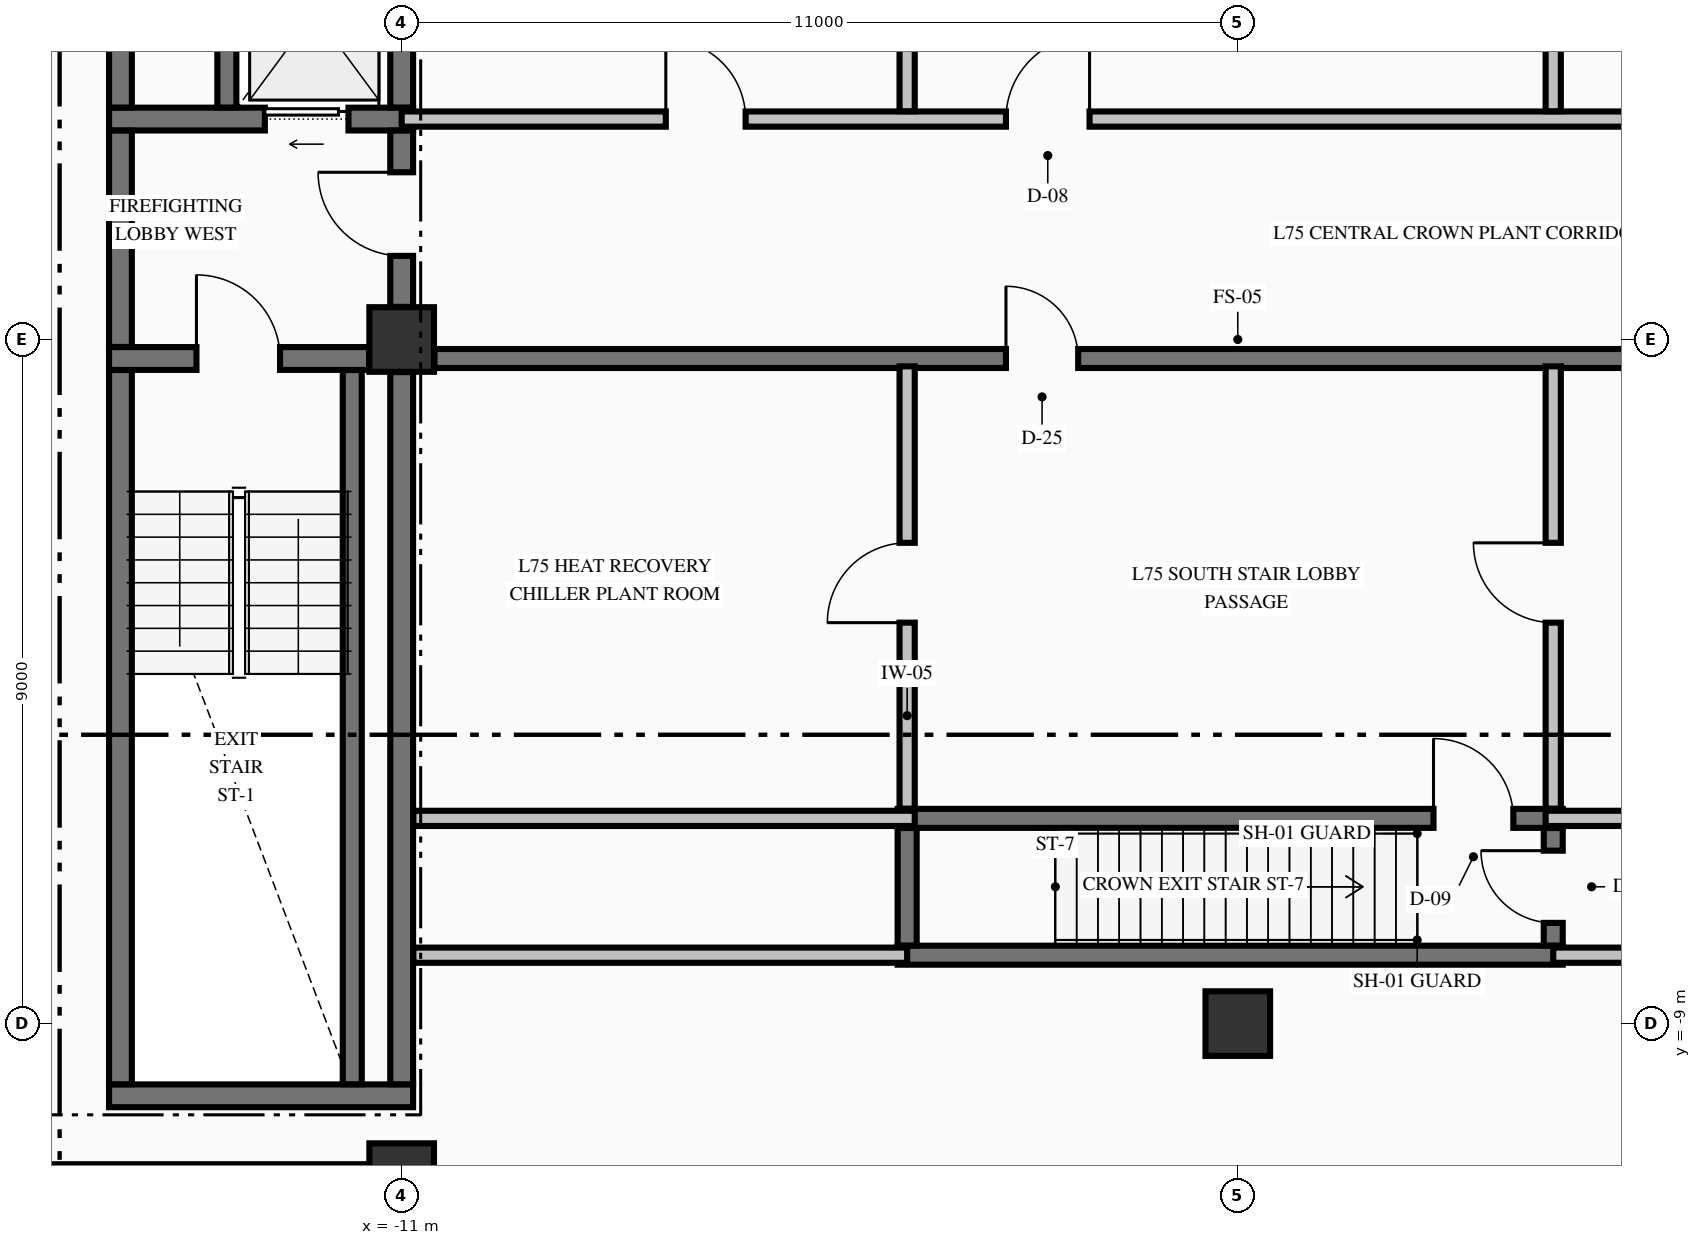
"""IFC4 building model, lengths in metres.
Left out: names, types, materials, properties, quantities, classifications, styles, units other than length and angle.
Written with IfcOpenShell. Run it as: python <this file> out.ifc"""

import sys

from ifc_helpers import new_model, si_unit, direction, frame, frame_2d, origin, origin_2d, place, context, subcontext, project, spatial, rectangle, extrude, element, fill, save


model = new_model("IFC4")
c1 = context("Model", 3, precision=1e-05, world=origin(), true_north=direction((0.0, 1.0)))
c2 = subcontext(c1, "Body", "Model", "MODEL_VIEW")
j1 = project(units=[si_unit("LENGTHUNIT", "METRE"), si_unit("PLANEANGLEUNIT", "RADIAN")], contexts=[c1])
p1 = place(None, origin())
s1 = spatial("IfcSite", under=j1, at=p1, CompositionType="ELEMENT")
p2 = place(p1, origin())
s2 = spatial("IfcBuilding", under=s1, at=p2, CompositionType="ELEMENT")
p3 = place(p2, frame((0.0, 0.0, 281.8)))
s3 = spatial("IfcBuildingStorey", under=s2, at=p3, CompositionType="ELEMENT", Elevation=281.8)
for number, where, z_axis, x_axis in (
    (1, (-11.0, -11.0, -0.325), (0.0, 0.0, 1.0), (1.0, 0.0, 0.0)),
    (2, (-11.0, 0.0, -0.325), (0.0, 0.0, 1.0), (1.0, 0.0, 0.0)),
    (3, (0.0, -9.0, -0.325), (0.0, 0.0, 1.0), (1.0, 0.0, 0.0)),
):
    element("IfcColumn", number, at=place(p3, frame(where, z_axis=z_axis, x_axis=x_axis)), inside=s3, PredefinedType="COLUMN", context=c2, shape_type="SweptSolid", body=[
        extrude(rectangle(XDim=0.85, YDim=0.85, at=origin_2d()), origin(), (0.0, 0.0, 1.0), 3.06),
    ])
p4 = place(p3, frame((-19.545, -11.0, 0.0), z_axis=(0.0, 0.0, 1.0), x_axis=(1.0, 0.0, 0.0)))
e4 = element("IfcWall", 4, at=p4, inside=s3, PredefinedType="STANDARD", context=c2, shape_type="SweptSolid", body=[
    extrude(rectangle(XDim=8.09, YDim=0.3, at=frame_2d((4.045, 0.0))), origin(), (0.0, 0.0, 1.0), 1.077),
])
p5 = place(p3, frame((-14.85, -9.95, 0.0), z_axis=(0.0, 0.0, 1.0), x_axis=(1.0, 0.0, 0.0)))
e5 = element("IfcWall", 5, at=p5, inside=s3, PredefinedType="SHEAR", context=c2, shape_type="SweptSolid", body=[
    extrude(rectangle(XDim=4.0, YDim=0.3, at=frame_2d((2.0, 0.0))), origin(), (0.0, 0.0, 1.0), 2.735),
])
p6 = place(p3, frame((-4.475, -8.1, 0.0), z_axis=(0.0, 0.0, 1.0), x_axis=(1.0, 0.0, 0.0)))
e6 = element("IfcWall", 6, at=p6, inside=s3, PredefinedType="SOLIDWALL", context=c2, shape_type="SweptSolid", body=[
    extrude(rectangle(XDim=8.75, YDim=0.25, at=frame_2d((4.375, 0.0))), origin(), (0.0, 0.0, 1.0), 2.735),
])
p7 = place(p3, frame((-4.475, -6.3, 0.0), z_axis=(0.0, 0.0, 1.0), x_axis=(1.0, 0.0, 0.0)))
e7 = element("IfcWall", 7, at=p7, inside=s3, PredefinedType="SOLIDWALL", context=c2, shape_type="SweptSolid", body=[
    extrude(rectangle(XDim=8.75, YDim=0.25, at=frame_2d((4.375, 0.0))), origin(), (0.0, 0.0, 1.0), 2.735),
])
p8 = place(p7, frame((7.05, 0.0, 0.0)))
e8 = element("IfcOpeningElement", 8, at=p8, cuts=e7, PredefinedType="OPENING", context=c2, shape_type="SweptSolid", body=[
    extrude(rectangle(XDim=1.05, YDim=2.15, at=frame_2d((0.525, 1.075))), frame((0.0, 0.135, 0.0), z_axis=(0.0, -1.0, 0.0), x_axis=(1.0, 0.0, 0.0)), (0.0, 0.0, 1.0), 0.27),
])
p9 = place(p3, frame((-14.85, -0.25, 0.0), z_axis=(0.0, 0.0, 1.0), x_axis=(1.0, 0.0, 0.0)))
e9 = element("IfcWall", 9, at=p9, inside=s3, PredefinedType="SHEAR", context=c2, shape_type="SweptSolid", body=[
    extrude(rectangle(XDim=3.421, YDim=0.3, at=frame_2d((1.71, 0.0))), origin(), (0.0, 0.0, 1.0), 2.735),
])
p10 = place(p9, frame((1.15, 0.0, 0.0)))
e10 = element("IfcOpeningElement", 10, at=p10, cuts=e9, PredefinedType="OPENING", context=c2, shape_type="SweptSolid", body=[
    extrude(rectangle(XDim=1.1, YDim=2.15, at=frame_2d((0.55, 1.075))), frame((0.0, 0.16, 0.0), z_axis=(0.0, -1.0, 0.0), x_axis=(1.0, 0.0, 0.0)), (0.0, 0.0, 1.0), 0.32),
])
p11 = place(p3, frame((-14.85, 2.9, 0.0), z_axis=(0.0, 0.0, 1.0), x_axis=(1.0, 0.0, 0.0)))
e11 = element("IfcWall", 11, at=p11, inside=s3, PredefinedType="SHEAR", context=c2, shape_type="SweptSolid", body=[
    extrude(rectangle(XDim=4.0, YDim=0.3, at=frame_2d((2.0, 0.0))), origin(), (0.0, 0.0, 1.0), 2.735),
])
p12 = place(p11, frame((2.05, 0.0, 0.0)))
e12 = element("IfcOpeningElement", 12, at=p12, cuts=e11, PredefinedType="OPENING", context=c2, shape_type="SweptSolid", body=[
    extrude(rectangle(XDim=1.1, YDim=2.2, at=frame_2d((0.55, 1.1))), frame((0.0, 0.16, 0.0), z_axis=(0.0, -1.0, 0.0), x_axis=(1.0, 0.0, 0.0)), (0.0, 0.0, 1.0), 0.32),
])
p13 = place(p3, frame((-10.847, -8.1, 0.0), z_axis=(0.0, 0.0, 1.0), x_axis=(1.0, 0.0, 0.0)))
e13 = element("IfcWall", 13, at=p13, inside=s3, PredefinedType="PARTITIONING", context=c2, shape_type="SweptSolid", body=[
    extrude(rectangle(XDim=6.497, YDim=0.2, at=frame_2d((3.249, 0.0))), origin(), (0.0, 0.0, 1.0), 2.735),
])
p14 = place(p3, frame((4.15, -8.1, 0.0), z_axis=(0.0, 0.0, 1.0), x_axis=(1.0, 0.0, 0.0)))
e14 = element("IfcWall", 14, at=p14, inside=s3, PredefinedType="PARTITIONING", context=c2, shape_type="SweptSolid", body=[
    extrude(rectangle(XDim=6.697, YDim=0.2, at=frame_2d((3.349, 0.0))), origin(), (0.0, 0.0, 1.0), 2.735),
])
p15 = place(p14, frame((2.125, 0.0, 0.0)))
e15 = element("IfcOpeningElement", 15, at=p15, cuts=e14, PredefinedType="OPENING", context=c2, shape_type="SweptSolid", body=[
    extrude(rectangle(XDim=1.05, YDim=2.15, at=frame_2d((0.525, 1.075))), frame((0.0, 0.11, 0.0), z_axis=(0.0, -1.0, 0.0), x_axis=(1.0, 0.0, 0.0)), (0.0, 0.0, 1.0), 0.22),
])
p16 = place(p3, frame((-10.847, -6.3, 0.0), z_axis=(0.0, 0.0, 1.0), x_axis=(1.0, 0.0, 0.0)))
e16 = element("IfcWall", 16, at=p16, inside=s3, PredefinedType="PARTITIONING", context=c2, shape_type="SweptSolid", body=[
    extrude(rectangle(XDim=6.597, YDim=0.2, at=frame_2d((3.298, 0.0))), origin(), (0.0, 0.0, 1.0), 2.735),
])
p17 = place(p3, frame((4.05, -6.3, 0.0), z_axis=(0.0, 0.0, 1.0), x_axis=(1.0, 0.0, 0.0)))
e17 = element("IfcWall", 17, at=p17, inside=s3, PredefinedType="PARTITIONING", context=c2, shape_type="SweptSolid", body=[
    extrude(rectangle(XDim=6.797, YDim=0.2, at=frame_2d((3.398, 0.0))), origin(), (0.0, 0.0, 1.0), 2.735),
])
p18 = place(p3, frame((-10.569, -0.25, 0.0), z_axis=(0.0, 0.0, 1.0), x_axis=(1.0, 0.0, 0.0)))
e18 = element("IfcWall", 18, at=p18, inside=s3, PredefinedType="SOLIDWALL", context=c2, shape_type="SweptSolid", body=[
    extrude(rectangle(XDim=21.138, YDim=0.25, at=frame_2d((10.569, 0.0))), origin(), (0.0, 0.0, 1.0), 2.735),
])
p19 = place(p18, frame((7.519, 0.0, 0.0)))
e19 = element("IfcOpeningElement", 19, at=p19, cuts=e18, PredefinedType="OPENING", context=c2, shape_type="SweptSolid", body=[
    extrude(rectangle(XDim=0.95, YDim=2.02, at=frame_2d((0.475, 1.01))), frame((0.0, 0.135, 0.0), z_axis=(0.0, -1.0, 0.0), x_axis=(1.0, 0.0, 0.0)), (0.0, 0.0, 1.0), 0.27),
])
p20 = place(p3, frame((-11.0, 2.9, 0.0), z_axis=(0.0, 0.0, 1.0), x_axis=(1.0, 0.0, 0.0)))
e20 = element("IfcWall", 20, at=p20, inside=s3, PredefinedType="PARTITIONING", context=c2, shape_type="SweptSolid", body=[
    extrude(rectangle(XDim=22.0, YDim=0.2, at=frame_2d((11.0, 0.0))), origin(), (0.0, 0.0, 1.0), 2.735),
])
p21 = place(p20, frame((7.95, 0.0, 0.0)))
e21 = element("IfcOpeningElement", 21, at=p21, cuts=e20, PredefinedType="OPENING", context=c2, shape_type="SweptSolid", body=[
    extrude(rectangle(XDim=1.1, YDim=2.15, at=frame_2d((0.55, 1.075))), frame((0.0, 0.11, 0.0), z_axis=(0.0, -1.0, 0.0), x_axis=(1.0, 0.0, 0.0)), (0.0, 0.0, 1.0), 0.22),
])
p22 = place(p20, frame((17.475, 0.0, 0.0)))
e22 = element("IfcOpeningElement", 22, at=p22, cuts=e20, PredefinedType="OPENING", context=c2, shape_type="SweptSolid", body=[
    extrude(rectangle(XDim=1.05, YDim=2.15, at=frame_2d((0.525, 1.075))), frame((0.0, 0.11, 0.0), z_axis=(0.0, -1.0, 0.0), x_axis=(1.0, 0.0, 0.0)), (0.0, 0.0, 1.0), 0.22),
])
p23 = place(p20, frame((3.475, 0.0, 0.0)))
e23 = element("IfcOpeningElement", 23, at=p23, cuts=e20, PredefinedType="OPENING", context=c2, shape_type="SweptSolid", body=[
    extrude(rectangle(XDim=1.05, YDim=2.15, at=frame_2d((0.525, 1.075))), frame((0.0, 0.11, 0.0), z_axis=(0.0, -1.0, 0.0), x_axis=(1.0, 0.0, 0.0)), (0.0, 0.0, 1.0), 0.22),
])
p24 = place(p3, frame((-14.7, -9.798, 0.0), z_axis=(0.0, 0.0, 1.0), x_axis=(0.0, 1.0, 0.0)))
e24 = element("IfcWall", 24, at=p24, inside=s3, PredefinedType="SHEAR", context=c2, shape_type="SweptSolid", body=[
    extrude(rectangle(XDim=9.396, YDim=0.3, at=frame_2d((4.698, 0.0))), origin(), (0.0, 0.0, 1.0), 2.735),
])
p25 = place(p3, frame((-14.7, -0.098, 0.0), z_axis=(0.0, 0.0, 1.0), x_axis=(0.0, 1.0, 0.0)))
e25 = element("IfcWall", 25, at=p25, inside=s3, PredefinedType="SHEAR", context=c2, shape_type="SweptSolid", body=[
    extrude(rectangle(XDim=2.846, YDim=0.3, at=frame_2d((1.423, 0.0))), origin(), (0.0, 0.0, 1.0), 2.735),
])
p26 = place(p3, frame((-14.7, 3.052, 0.0), z_axis=(0.0, 0.0, 1.0), x_axis=(0.0, 1.0, 0.0)))
e26 = element("IfcWall", 26, at=p26, inside=s3, PredefinedType="SHEAR", context=c2, shape_type="SweptSolid", body=[
    extrude(rectangle(XDim=2.496, YDim=0.3, at=frame_2d((1.248, 0.0))), origin(), (0.0, 0.0, 1.0), 2.735),
])
p27 = place(p3, frame((-13.3, 3.052, 0.0), z_axis=(0.0, 0.0, 1.0), x_axis=(0.0, 1.0, 0.0)))
e27 = element("IfcWall", 27, at=p27, inside=s3, PredefinedType="SOLIDWALL", context=c2, shape_type="SweptSolid", body=[
    extrude(rectangle(XDim=2.496, YDim=0.25, at=frame_2d((1.248, 0.0))), origin(), (0.0, 0.0, 1.0), 2.735),
])
p28 = place(p3, frame((-11.65, -9.798, 0.0), z_axis=(0.0, 0.0, 1.0), x_axis=(0.0, 1.0, 0.0)))
e28 = element("IfcWall", 28, at=p28, inside=s3, PredefinedType="SOLIDWALL", context=c2, shape_type="SweptSolid", body=[
    extrude(rectangle(XDim=9.396, YDim=0.25, at=frame_2d((4.698, 0.0))), origin(), (0.0, 0.0, 1.0), 2.735),
])
p29 = place(p3, frame((-11.0, -9.798, 0.0), z_axis=(0.0, 0.0, 1.0), x_axis=(0.0, 1.0, 0.0)))
e29 = element("IfcWall", 29, at=p29, inside=s3, PredefinedType="SHEAR", context=c2, shape_type="SweptSolid", body=[
    extrude(rectangle(XDim=9.369, YDim=0.3, at=frame_2d((4.685, 0.0))), origin(), (0.0, 0.0, 1.0), 2.735),
])
p30 = place(p3, frame((-11.0, 0.429, 0.0), z_axis=(0.0, 0.0, 1.0), x_axis=(0.0, 1.0, 0.0)))
e30 = element("IfcWall", 30, at=p30, inside=s3, PredefinedType="SHEAR", context=c2, shape_type="SweptSolid", body=[
    extrude(rectangle(XDim=2.319, YDim=0.3, at=frame_2d((1.16, 0.0))), origin(), (0.0, 0.0, 1.0), 2.735),
])
p31 = place(p30, frame((0.671, 0.0, 0.0)))
e31 = element("IfcOpeningElement", 31, at=p31, cuts=e30, PredefinedType="OPENING", context=c2, shape_type="SweptSolid", body=[
    extrude(rectangle(XDim=1.1, YDim=2.15, at=frame_2d((0.55, 1.075))), frame((0.0, 0.16, 0.0), z_axis=(0.0, -1.0, 0.0), x_axis=(1.0, 0.0, 0.0)), (0.0, 0.0, 1.0), 0.32),
])
p32 = place(p3, frame((-11.0, 3.052, 0.0), z_axis=(0.0, 0.0, 1.0), x_axis=(0.0, 1.0, 0.0)))
e32 = element("IfcWall", 32, at=p32, inside=s3, PredefinedType="SHEAR", context=c2, shape_type="SweptSolid", body=[
    extrude(rectangle(XDim=2.496, YDim=0.3, at=frame_2d((1.248, 0.0))), origin(), (0.0, 0.0, 1.0), 2.735),
])
p33 = place(p3, frame((-4.35, -7.973, 0.0), z_axis=(0.0, 0.0, 1.0), x_axis=(0.0, 1.0, 0.0)))
e33 = element("IfcWall", 33, at=p33, inside=s3, PredefinedType="SOLIDWALL", context=c2, shape_type="SweptSolid", body=[
    extrude(rectangle(XDim=1.546, YDim=0.25, at=frame_2d((0.773, 0.0))), origin(), (0.0, 0.0, 1.0), 2.735),
])
p34 = place(p3, frame((4.15, -7.973, 0.0), z_axis=(0.0, 0.0, 1.0), x_axis=(0.0, 1.0, 0.0)))
e34 = element("IfcWall", 34, at=p34, inside=s3, PredefinedType="SOLIDWALL", context=c2, shape_type="SweptSolid", body=[
    extrude(rectangle(XDim=1.546, YDim=0.25, at=frame_2d((0.773, 0.0))), origin(), (0.0, 0.0, 1.0), 2.735),
])
p35 = place(p34, frame((0.298, 0.0, 0.0)))
e35 = element("IfcOpeningElement", 35, at=p35, cuts=e34, PredefinedType="OPENING", context=c2, shape_type="SweptSolid", body=[
    extrude(rectangle(XDim=0.95, YDim=2.15, at=frame_2d((0.475, 1.075))), frame((0.0, 0.135, 0.0), z_axis=(0.0, -1.0, 0.0), x_axis=(1.0, 0.0, 0.0)), (0.0, 0.0, 1.0), 0.27),
])
p36 = place(p3, frame((-4.35, -6.172, 0.0), z_axis=(0.0, 0.0, 1.0), x_axis=(0.0, 1.0, 0.0)))
e36 = element("IfcWall", 36, at=p36, inside=s3, PredefinedType="PARTITIONING", context=c2, shape_type="SweptSolid", body=[
    extrude(rectangle(XDim=5.819, YDim=0.2, at=frame_2d((2.91, 0.0))), origin(), (0.0, 0.0, 1.0), 2.735),
])
p37 = place(p36, frame((2.447, 0.0, 0.0)))
e37 = element("IfcOpeningElement", 37, at=p37, cuts=e36, PredefinedType="OPENING", context=c2, shape_type="SweptSolid", body=[
    extrude(rectangle(XDim=1.05, YDim=2.15, at=frame_2d((0.525, 1.075))), frame((0.0, 0.11, 0.0), z_axis=(0.0, -1.0, 0.0), x_axis=(1.0, 0.0, 0.0)), (0.0, 0.0, 1.0), 0.22),
])
p38 = place(p3, frame((-4.35, 3.003, 0.0), z_axis=(0.0, 0.0, 1.0), x_axis=(0.0, 1.0, 0.0)))
e38 = element("IfcWall", 38, at=p38, inside=s3, PredefinedType="PARTITIONING", context=c2, shape_type="SweptSolid", body=[
    extrude(rectangle(XDim=3.169, YDim=0.2, at=frame_2d((1.584, 0.0))), origin(), (0.0, 0.0, 1.0), 2.735),
])
p39 = place(p3, frame((4.15, -6.172, 0.0), z_axis=(0.0, 0.0, 1.0), x_axis=(0.0, 1.0, 0.0)))
e39 = element("IfcWall", 39, at=p39, inside=s3, PredefinedType="PARTITIONING", context=c2, shape_type="SweptSolid", body=[
    extrude(rectangle(XDim=5.819, YDim=0.2, at=frame_2d((2.91, 0.0))), origin(), (0.0, 0.0, 1.0), 2.735),
])
p40 = place(p39, frame((2.447, 0.0, 0.0)))
e40 = element("IfcOpeningElement", 40, at=p40, cuts=e39, PredefinedType="OPENING", context=c2, shape_type="SweptSolid", body=[
    extrude(rectangle(XDim=1.05, YDim=2.15, at=frame_2d((0.525, 1.075))), frame((0.0, 0.11, 0.0), z_axis=(0.0, -1.0, 0.0), x_axis=(1.0, 0.0, 0.0)), (0.0, 0.0, 1.0), 0.22),
])
p41 = place(p3, frame((4.15, 3.003, 0.0), z_axis=(0.0, 0.0, 1.0), x_axis=(0.0, 1.0, 0.0)))
e41 = element("IfcWall", 41, at=p41, inside=s3, PredefinedType="PARTITIONING", context=c2, shape_type="SweptSolid", body=[
    extrude(rectangle(XDim=3.169, YDim=0.2, at=frame_2d((1.584, 0.0))), origin(), (0.0, 0.0, 1.0), 2.735),
])
p42 = place(p10, origin())
e42 = element("IfcDoor", 42, at=p42, inside=s3, OperationType="SINGLE_SWING_LEFT", PredefinedType="DOOR", context=c2, shape_type="SweptSolid", body=[
    extrude(rectangle(XDim=1.1, YDim=2.15, at=frame_2d((0.55, 1.075))), frame((0.0, 0.025, 0.0), z_axis=(0.0, -1.0, 0.0), x_axis=(1.0, 0.0, 0.0)), (0.0, 0.0, 1.0), 0.05),
])
fill(e10, e42)
p43 = place(p31, origin())
e43 = element("IfcDoor", 43, at=p43, inside=s3, OperationType="SINGLE_SWING_RIGHT", PredefinedType="DOOR", context=c2, shape_type="SweptSolid", body=[
    extrude(rectangle(XDim=1.1, YDim=2.15, at=frame_2d((0.55, 1.075))), frame((0.0, 0.025, 0.0), z_axis=(0.0, -1.0, 0.0), x_axis=(1.0, 0.0, 0.0)), (0.0, 0.0, 1.0), 0.05),
])
fill(e31, e43)
p44 = place(p12, origin())
e44 = element("IfcDoor", 44, at=p44, inside=s3, OperationType="SLIDING_TO_LEFT", PredefinedType="DOOR", context=c2, shape_type="SweptSolid", body=[
    extrude(rectangle(XDim=1.1, YDim=2.2, at=frame_2d((0.55, 1.1))), frame((0.0, 0.025, 0.0), z_axis=(0.0, -1.0, 0.0), x_axis=(1.0, 0.0, 0.0)), (0.0, 0.0, 1.0), 0.05),
])
fill(e12, e44)
p45 = place(p8, origin())
e45 = element("IfcDoor", 45, at=p45, inside=s3, OperationType="SINGLE_SWING_LEFT", PredefinedType="DOOR", context=c2, shape_type="SweptSolid", body=[
    extrude(rectangle(XDim=1.05, YDim=2.15, at=frame_2d((0.525, 1.075))), frame((0.0, 0.025, 0.0), z_axis=(0.0, -1.0, 0.0), x_axis=(1.0, 0.0, 0.0)), (0.0, 0.0, 1.0), 0.05),
])
fill(e8, e45)
p46 = place(p19, origin())
e46 = element("IfcDoor", 46, at=p46, inside=s3, OperationType="SINGLE_SWING_LEFT", PredefinedType="DOOR", context=c2, shape_type="SweptSolid", body=[
    extrude(rectangle(XDim=0.95, YDim=2.02, at=frame_2d((0.475, 1.01))), frame((0.0, 0.025, 0.0), z_axis=(0.0, -1.0, 0.0), x_axis=(1.0, 0.0, 0.0)), (0.0, 0.0, 1.0), 0.05),
])
fill(e19, e46)
p47 = place(p21, origin())
e47 = element("IfcDoor", 47, at=p47, inside=s3, OperationType="SINGLE_SWING_RIGHT", PredefinedType="DOOR", context=c2, shape_type="SweptSolid", body=[
    extrude(rectangle(XDim=1.1, YDim=2.15, at=frame_2d((0.55, 1.075))), frame((0.0, 0.025, 0.0), z_axis=(0.0, -1.0, 0.0), x_axis=(1.0, 0.0, 0.0)), (0.0, 0.0, 1.0), 0.05),
])
fill(e21, e47)
p48 = place(p37, origin())
e48 = element("IfcDoor", 48, at=p48, inside=s3, OperationType="SINGLE_SWING_LEFT", PredefinedType="DOOR", context=c2, shape_type="SweptSolid", body=[
    extrude(rectangle(XDim=1.05, YDim=2.15, at=frame_2d((0.525, 1.075))), frame((0.0, 0.025, 0.0), z_axis=(0.0, -1.0, 0.0), x_axis=(1.0, 0.0, 0.0)), (0.0, 0.0, 1.0), 0.05),
])
fill(e37, e48)
p49 = place(p40, origin())
e49 = element("IfcDoor", 49, at=p49, inside=s3, OperationType="SINGLE_SWING_RIGHT", PredefinedType="DOOR", context=c2, shape_type="SweptSolid", body=[
    extrude(rectangle(XDim=1.05, YDim=2.15, at=frame_2d((0.525, 1.075))), frame((0.0, 0.025, 0.0), z_axis=(0.0, -1.0, 0.0), x_axis=(1.0, 0.0, 0.0)), (0.0, 0.0, 1.0), 0.05),
])
fill(e40, e49)
p50 = place(p23, origin())
e50 = element("IfcDoor", 50, at=p50, inside=s3, OperationType="SINGLE_SWING_LEFT", PredefinedType="DOOR", context=c2, shape_type="SweptSolid", body=[
    extrude(rectangle(XDim=1.05, YDim=2.15, at=frame_2d((0.525, 1.075))), frame((0.0, 0.025, 0.0), z_axis=(0.0, -1.0, 0.0), x_axis=(1.0, 0.0, 0.0)), (0.0, 0.0, 1.0), 0.05),
])
fill(e23, e50)
p51 = place(p35, origin())
e51 = element("IfcDoor", 51, at=p51, inside=s3, OperationType="SINGLE_SWING_RIGHT", PredefinedType="DOOR", context=c2, shape_type="SweptSolid", body=[
    extrude(rectangle(XDim=0.95, YDim=2.15, at=frame_2d((0.475, 1.075))), frame((0.0, 0.025, 0.0), z_axis=(0.0, -1.0, 0.0), x_axis=(1.0, 0.0, 0.0)), (0.0, 0.0, 1.0), 0.05),
])
fill(e35, e51)
save(model, sys.argv[1])
